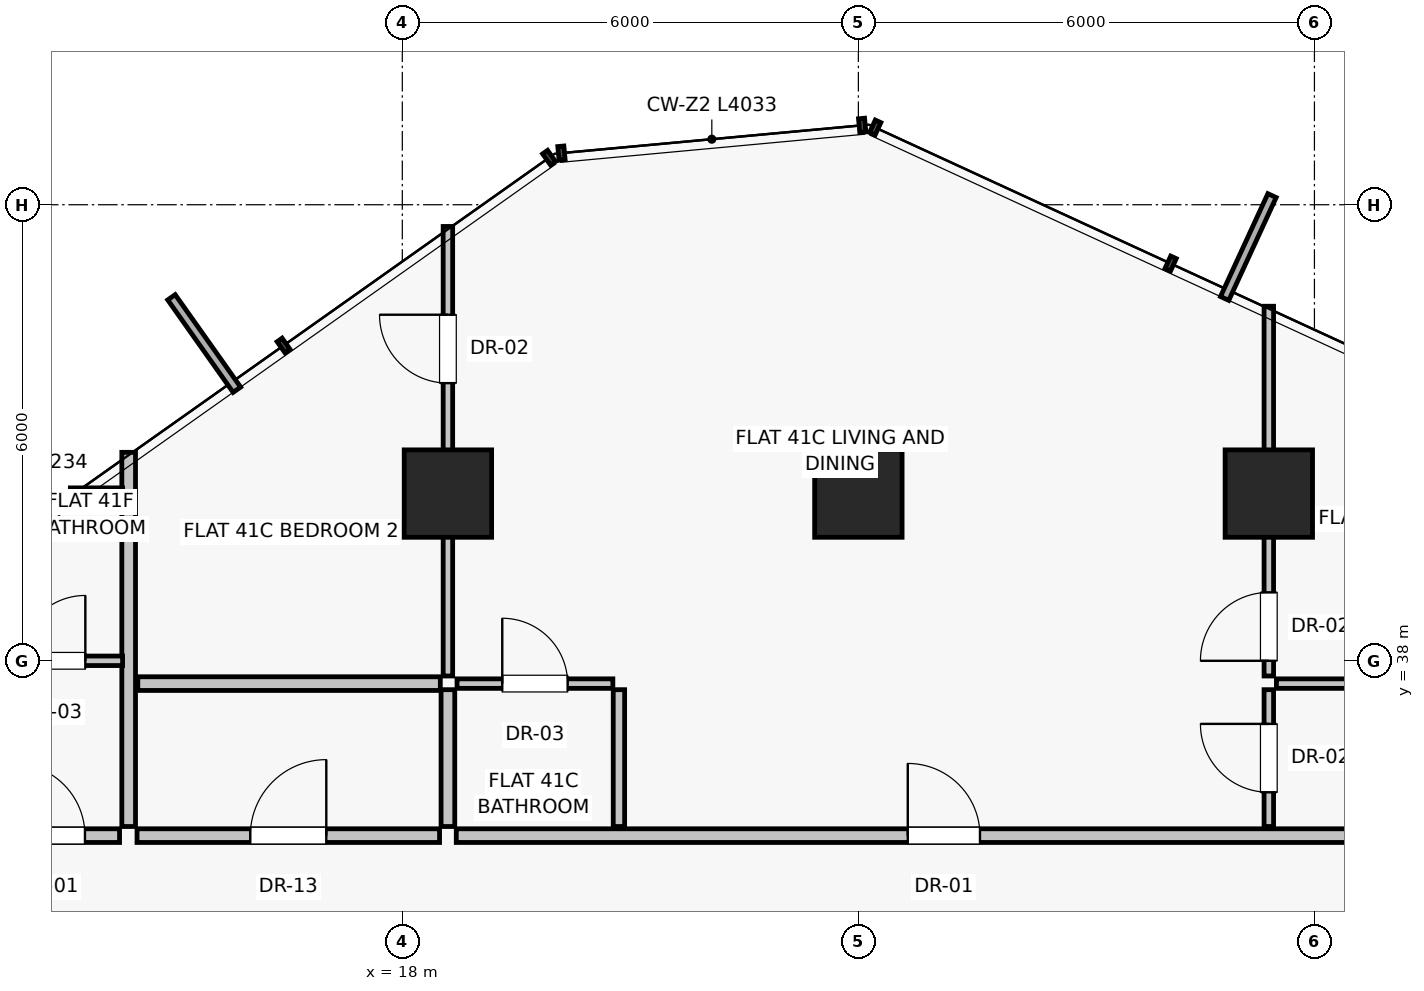
"""IFC4 building model, lengths in metres.
Left out: names, types, materials, properties, quantities, classifications, styles, units other than length and angle.
Written with IfcOpenShell. Run it as: python <this file> out.ifc"""

import sys

from ifc_helpers import new_model, si_unit, direction, frame, frame_2d, origin, origin_2d, place, context, subcontext, project, spatial, rectangle, extrude, source, transform, mapped, element, fill, save


model = new_model("IFC4")
c1 = context("Model", 3, precision=1e-05, world=origin(), true_north=direction((0.0, 1.0)))
c2 = subcontext(c1, "Body", "Model", "MODEL_VIEW")
j1 = project(units=[si_unit("LENGTHUNIT", "METRE"), si_unit("PLANEANGLEUNIT", "RADIAN")], contexts=[c1])
p1 = place(None, origin())
s1 = spatial("IfcSite", under=j1, at=p1, CompositionType="ELEMENT")
p2 = place(p1, origin())
s2 = spatial("IfcBuilding", under=s1, at=p2, CompositionType="ELEMENT")
p3 = place(p2, frame((0.0, 0.0, 145.75)))
s3 = spatial("IfcBuildingStorey", under=s2, at=p3, CompositionType="ELEMENT", Elevation=145.75)
for number, where, z_axis, x_axis in (
    (1, (29.4, 40.2, 0.0), (0.0, 0.0, 1.0), (1.0, 0.0, 0.0)),
    (2, (24.0, 40.2, 0.0), (0.0, 0.0, 1.0), (1.0, 0.0, 0.0)),
    (3, (18.6, 40.2, 0.0), (0.0, 0.0, 1.0), (1.0, 0.0, 0.0)),
):
    element("IfcColumn", number, at=place(p3, frame(where, z_axis=z_axis, x_axis=x_axis)), inside=s3, PredefinedType="COLUMN", context=c2, shape_type="SweptSolid", body=[
        extrude(rectangle(XDim=1.15, YDim=1.15, at=origin_2d()), origin(), (0.0, 0.0, 1.0), 3.25),
    ])
p4 = place(p3, frame((14.4, 35.82, 0.0), z_axis=(0.0, 0.0, 1.0), x_axis=(0.0, 1.0, 0.0)))
e4 = element("IfcWall", 4, at=p4, inside=s3, PredefinedType="PARTITIONING", context=c2, shape_type="SweptSolid", body=[
    extrude(rectangle(XDim=4.923, YDim=0.18, at=frame_2d((2.461, 0.0))), origin(), (0.0, 0.0, 1.0), 3.0),
])
p5 = place(p3, frame((14.51, 35.7, 0.0), z_axis=(0.0, 0.0, 1.0), x_axis=(1.0, 0.0, 0.0)))
e5 = element("IfcWall", 5, at=p5, inside=s3, PredefinedType="PARTITIONING", context=c2, shape_type="SweptSolid", body=[
    extrude(rectangle(XDim=3.98, YDim=0.18, at=frame_2d((1.99, 0.0))), origin(), (0.0, 0.0, 1.0), 2.58),
])
p6 = place(p5, frame((1.49, 0.0, 0.0)))
e6 = element("IfcOpeningElement", 6, at=p6, cuts=e5, PredefinedType="OPENING", context=c2, shape_type="SweptSolid", body=[
    extrude(rectangle(XDim=1.0, YDim=2.01, at=frame_2d((0.5, 1.005))), frame((0.0, 0.1, 0.0), z_axis=(0.0, -1.0, 0.0), x_axis=(1.0, 0.0, 0.0)), (0.0, 0.0, 1.0), 0.2),
])
p7 = place(p3, frame((18.71, 35.7, 0.0), z_axis=(0.0, 0.0, 1.0), x_axis=(1.0, 0.0, 0.0)))
e7 = element("IfcWall", 7, at=p7, inside=s3, PredefinedType="PARTITIONING", context=c2, shape_type="SweptSolid", body=[
    extrude(rectangle(XDim=14.78, YDim=0.18, at=frame_2d((7.39, 0.0))), origin(), (0.0, 0.0, 1.0), 2.58),
])
p8 = place(p7, frame((5.94, 0.0, 0.0)))
e8 = element("IfcOpeningElement", 8, at=p8, cuts=e7, PredefinedType="OPENING", context=c2, shape_type="SweptSolid", body=[
    extrude(rectangle(XDim=0.95, YDim=2.02, at=frame_2d((0.475, 1.01))), frame((0.0, 0.1, 0.0), z_axis=(0.0, -1.0, 0.0), x_axis=(1.0, 0.0, 0.0)), (0.0, 0.0, 1.0), 0.2),
])
p9 = place(p3, frame((14.52, 37.7, 0.0), z_axis=(0.0, 0.0, 1.0), x_axis=(1.0, 0.0, 0.0)))
e9 = element("IfcWall", 9, at=p9, inside=s3, PredefinedType="PARTITIONING", context=c2, shape_type="SweptSolid", body=[
    extrude(rectangle(XDim=3.98, YDim=0.18, at=frame_2d((1.99, 0.0))), origin(), (0.0, 0.0, 1.0), 3.0),
])
p10 = place(p3, frame((18.6, 35.82, 0.0), z_axis=(0.0, 0.0, 1.0), x_axis=(0.0, 1.0, 0.0)))
e10 = element("IfcWall", 10, at=p10, inside=s3, PredefinedType="PARTITIONING", context=c2, shape_type="SweptSolid", body=[
    extrude(rectangle(XDim=1.8, YDim=0.18, at=frame_2d((0.9, 0.0))), origin(), (0.0, 0.0, 1.0), 2.378),
])
p11 = place(p3, frame((18.6, 37.8, 0.0), z_axis=(0.0, 0.0, 1.0), x_axis=(0.0, 1.0, 0.0)))
e11 = element("IfcWall", 11, at=p11, inside=s3, PredefinedType="PARTITIONING", context=c2, shape_type="SweptSolid", body=[
    extrude(rectangle(XDim=5.914, YDim=0.125, at=frame_2d((2.957, 0.0))), origin(), (0.0, 0.0, 1.0), 2.378),
])
p12 = place(p11, frame((3.853, 0.0, 0.0)))
e12 = element("IfcOpeningElement", 12, at=p12, cuts=e11, PredefinedType="OPENING", context=c2, shape_type="SweptSolid", body=[
    extrude(rectangle(XDim=0.9, YDim=2.01, at=frame_2d((0.45, 1.005))), frame((0.0, 0.073, 0.0), z_axis=(0.0, -1.0, 0.0), x_axis=(1.0, 0.0, 0.0)), (0.0, 0.0, 1.0), 0.145),
])
p13 = place(p3, frame((20.85, 35.82, 0.0), z_axis=(0.0, 0.0, 1.0), x_axis=(0.0, 1.0, 0.0)))
e13 = element("IfcWall", 13, at=p13, inside=s3, PredefinedType="PARTITIONING", context=c2, shape_type="SweptSolid", body=[
    extrude(rectangle(XDim=1.8, YDim=0.15, at=frame_2d((0.9, 0.0))), origin(), (0.0, 0.0, 1.0), 3.0),
])
p14 = place(p3, frame((18.72, 37.7, 0.0), z_axis=(0.0, 0.0, 1.0), x_axis=(1.0, 0.0, 0.0)))
e14 = element("IfcWall", 14, at=p14, inside=s3, PredefinedType="PARTITIONING", context=c2, shape_type="SweptSolid", body=[
    extrude(rectangle(XDim=2.05, YDim=0.125, at=frame_2d((1.025, 0.0))), origin(), (0.0, 0.0, 1.0), 3.0),
])
p15 = place(p14, frame((0.595, 0.0, 0.0)))
e15 = element("IfcOpeningElement", 15, at=p15, cuts=e14, PredefinedType="OPENING", context=c2, shape_type="SweptSolid", body=[
    extrude(rectangle(XDim=0.86, YDim=2.01, at=frame_2d((0.43, 1.005))), frame((0.0, 0.073, 0.0), z_axis=(0.0, -1.0, 0.0), x_axis=(1.0, 0.0, 0.0)), (0.0, 0.0, 1.0), 0.145),
])
p16 = place(p3, frame((29.4, 35.82, 0.0), z_axis=(0.0, 0.0, 1.0), x_axis=(0.0, 1.0, 0.0)))
e16 = element("IfcWall", 16, at=p16, inside=s3, PredefinedType="PARTITIONING", context=c2, shape_type="SweptSolid", body=[
    extrude(rectangle(XDim=1.8, YDim=0.125, at=frame_2d((0.9, 0.0))), origin(), (0.0, 0.0, 1.0), 2.378),
])
p17 = place(p16, frame((0.45, 0.0, 0.0)))
e17 = element("IfcOpeningElement", 17, at=p17, cuts=e16, PredefinedType="OPENING", context=c2, shape_type="SweptSolid", body=[
    extrude(rectangle(XDim=0.9, YDim=2.01, at=frame_2d((0.45, 1.005))), frame((0.0, 0.073, 0.0), z_axis=(0.0, -1.0, 0.0), x_axis=(1.0, 0.0, 0.0)), (0.0, 0.0, 1.0), 0.145),
])
p18 = place(p3, frame((29.5, 37.7, 0.0), z_axis=(0.0, 0.0, 1.0), x_axis=(1.0, 0.0, 0.0)))
e18 = element("IfcWall", 18, at=p18, inside=s3, PredefinedType="PARTITIONING", context=c2, shape_type="SweptSolid", body=[
    extrude(rectangle(XDim=3.98, YDim=0.125, at=frame_2d((1.99, 0.0))), origin(), (0.0, 0.0, 1.0), 3.0),
])
p19 = place(p3, frame((29.4, 37.8, 0.0), z_axis=(0.0, 0.0, 1.0), x_axis=(0.0, 1.0, 0.0)))
e19 = element("IfcWall", 19, at=p19, inside=s3, PredefinedType="PARTITIONING", context=c2, shape_type="SweptSolid", body=[
    extrude(rectangle(XDim=4.865, YDim=0.125, at=frame_2d((2.432, 0.0))), origin(), (0.0, 0.0, 1.0), 2.378),
])
p20 = place(p19, frame((0.2, 0.0, 0.0)))
e20 = element("IfcOpeningElement", 20, at=p20, cuts=e19, PredefinedType="OPENING", context=c2, shape_type="SweptSolid", body=[
    extrude(rectangle(XDim=0.9, YDim=2.01, at=frame_2d((0.45, 1.005))), frame((0.0, 0.073, 0.0), z_axis=(0.0, -1.0, 0.0), x_axis=(1.0, 0.0, 0.0)), (0.0, 0.0, 1.0), 0.145),
])
p21 = place(p3, frame((12.42, 35.7, 0.0), z_axis=(0.0, 0.0, 1.0), x_axis=(1.0, 0.0, 0.0)))
e21 = element("IfcWall", 21, at=p21, inside=s3, PredefinedType="PARTITIONING", context=c2, shape_type="SweptSolid", body=[
    extrude(rectangle(XDim=1.86, YDim=0.18, at=frame_2d((0.93, 0.0))), origin(), (0.0, 0.0, 1.0), 3.0),
])
p22 = place(p21, frame((0.455, 0.0, 0.0)))
e22 = element("IfcOpeningElement", 22, at=p22, cuts=e21, PredefinedType="OPENING", context=c2, shape_type="SweptSolid", body=[
    extrude(rectangle(XDim=0.95, YDim=2.02, at=frame_2d((0.475, 1.01))), frame((0.0, 0.1, 0.0), z_axis=(0.0, -1.0, 0.0), x_axis=(1.0, 0.0, 0.0)), (0.0, 0.0, 1.0), 0.2),
])
p23 = place(p3, frame((12.48, 38.0, 0.0), z_axis=(0.0, 0.0, 1.0), x_axis=(1.0, 0.0, 0.0)))
e23 = element("IfcWall", 23, at=p23, inside=s3, PredefinedType="PARTITIONING", context=c2, shape_type="SweptSolid", body=[
    extrude(rectangle(XDim=1.84, YDim=0.125, at=frame_2d((0.92, 0.0))), origin(), (0.0, 0.0, 1.0), 3.0),
])
p24 = place(p23, frame((0.49, 0.0, 0.0)))
e24 = element("IfcOpeningElement", 24, at=p24, cuts=e23, PredefinedType="OPENING", context=c2, shape_type="SweptSolid", body=[
    extrude(rectangle(XDim=0.86, YDim=2.01, at=frame_2d((0.43, 1.005))), frame((0.0, 0.073, 0.0), z_axis=(0.0, -1.0, 0.0), x_axis=(1.0, 0.0, 0.0)), (0.0, 0.0, 1.0), 0.145),
])
p25 = place(p3, frame((13.633, 40.2, 0.0), z_axis=(0.0, 0.0, 1.0), x_axis=(1.0, 0.0, 0.0)))
e25 = element("IfcWall", 25, at=p25, inside=s3, PredefinedType="PARTITIONING", context=c2, shape_type="SweptSolid", body=[
    extrude(rectangle(XDim=0.687, YDim=0.15, at=frame_2d((0.344, 0.0))), origin(), (0.0, 0.0, 1.0), 3.0),
])
m1 = source(origin(), c2, "Body", "SweptSolid", [
    extrude(rectangle(XDim=1.0, YDim=2.01, at=frame_2d((0.5, 1.005))), frame((0.0, 0.025, 0.0), z_axis=(0.0, -1.0, 0.0), x_axis=(1.0, 0.0, 0.0)), (0.0, 0.0, 1.0), 0.05),
])
p26 = place(p6, origin())
e26 = element("IfcDoor", 26, at=p26, inside=s3, OperationType="SINGLE_SWING_RIGHT", PredefinedType="DOOR", context=c2, shape_type="MappedRepresentation", body=[
    mapped(m1, transform((0.0, 0.0, 0.0), scale=1.0)),
])
fill(e6, e26)
m2 = source(origin(), c2, "Body", "SweptSolid", [
    extrude(rectangle(XDim=0.95, YDim=2.02, at=frame_2d((0.475, 1.01))), frame((0.0, 0.025, 0.0), z_axis=(0.0, -1.0, 0.0), x_axis=(1.0, 0.0, 0.0)), (0.0, 0.0, 1.0), 0.05),
])
p27 = place(p8, origin())
e27 = element("IfcDoor", 27, at=p27, inside=s3, OperationType="SINGLE_SWING_LEFT", PredefinedType="DOOR", context=c2, shape_type="MappedRepresentation", body=[
    mapped(m2, transform((0.0, 0.0, 0.0), scale=1.0)),
])
fill(e8, e27)
m3 = source(origin(), c2, "Body", "SweptSolid", [
    extrude(rectangle(XDim=0.9, YDim=2.01, at=frame_2d((0.45, 1.005))), frame((0.0, 0.025, 0.0), z_axis=(0.0, -1.0, 0.0), x_axis=(1.0, 0.0, 0.0)), (0.0, 0.0, 1.0), 0.05),
])
p28 = place(p12, origin())
e28 = element("IfcDoor", 28, at=p28, inside=s3, OperationType="SINGLE_SWING_RIGHT", PredefinedType="DOOR", context=c2, shape_type="MappedRepresentation", body=[
    mapped(m3, transform((0.0, 0.0, 0.0), scale=1.0)),
])
fill(e12, e28)
m4 = source(origin(), c2, "Body", "SweptSolid", [
    extrude(rectangle(XDim=0.86, YDim=2.01, at=frame_2d((0.43, 1.005))), frame((0.0, 0.025, 0.0), z_axis=(0.0, -1.0, 0.0), x_axis=(1.0, 0.0, 0.0)), (0.0, 0.0, 1.0), 0.05),
])
p29 = place(p15, origin())
e29 = element("IfcDoor", 29, at=p29, inside=s3, OperationType="SINGLE_SWING_LEFT", PredefinedType="DOOR", context=c2, shape_type="MappedRepresentation", body=[
    mapped(m4, transform((0.0, 0.0, 0.0), scale=1.0)),
])
fill(e15, e29)
p30 = place(p17, origin())
e30 = element("IfcDoor", 30, at=p30, inside=s3, OperationType="SINGLE_SWING_RIGHT", PredefinedType="DOOR", context=c2, shape_type="MappedRepresentation", body=[
    mapped(m3, transform((0.0, 0.0, 0.0), scale=1.0)),
])
fill(e17, e30)
p31 = place(p20, origin())
e31 = element("IfcDoor", 31, at=p31, inside=s3, OperationType="SINGLE_SWING_LEFT", PredefinedType="DOOR", context=c2, shape_type="MappedRepresentation", body=[
    mapped(m3, transform((0.0, 0.0, 0.0), scale=1.0)),
])
fill(e20, e31)
p32 = place(p22, origin())
e32 = element("IfcDoor", 32, at=p32, inside=s3, OperationType="SINGLE_SWING_LEFT", PredefinedType="DOOR", context=c2, shape_type="MappedRepresentation", body=[
    mapped(m2, transform((0.0, 0.0, 0.0), scale=1.0)),
])
fill(e22, e32)
p33 = place(p24, origin())
e33 = element("IfcDoor", 33, at=p33, inside=s3, OperationType="SINGLE_SWING_RIGHT", PredefinedType="DOOR", context=c2, shape_type="MappedRepresentation", body=[
    mapped(m4, transform((0.0, 0.0, 0.0), scale=1.0)),
])
fill(e24, e33)
save(model, sys.argv[1])
